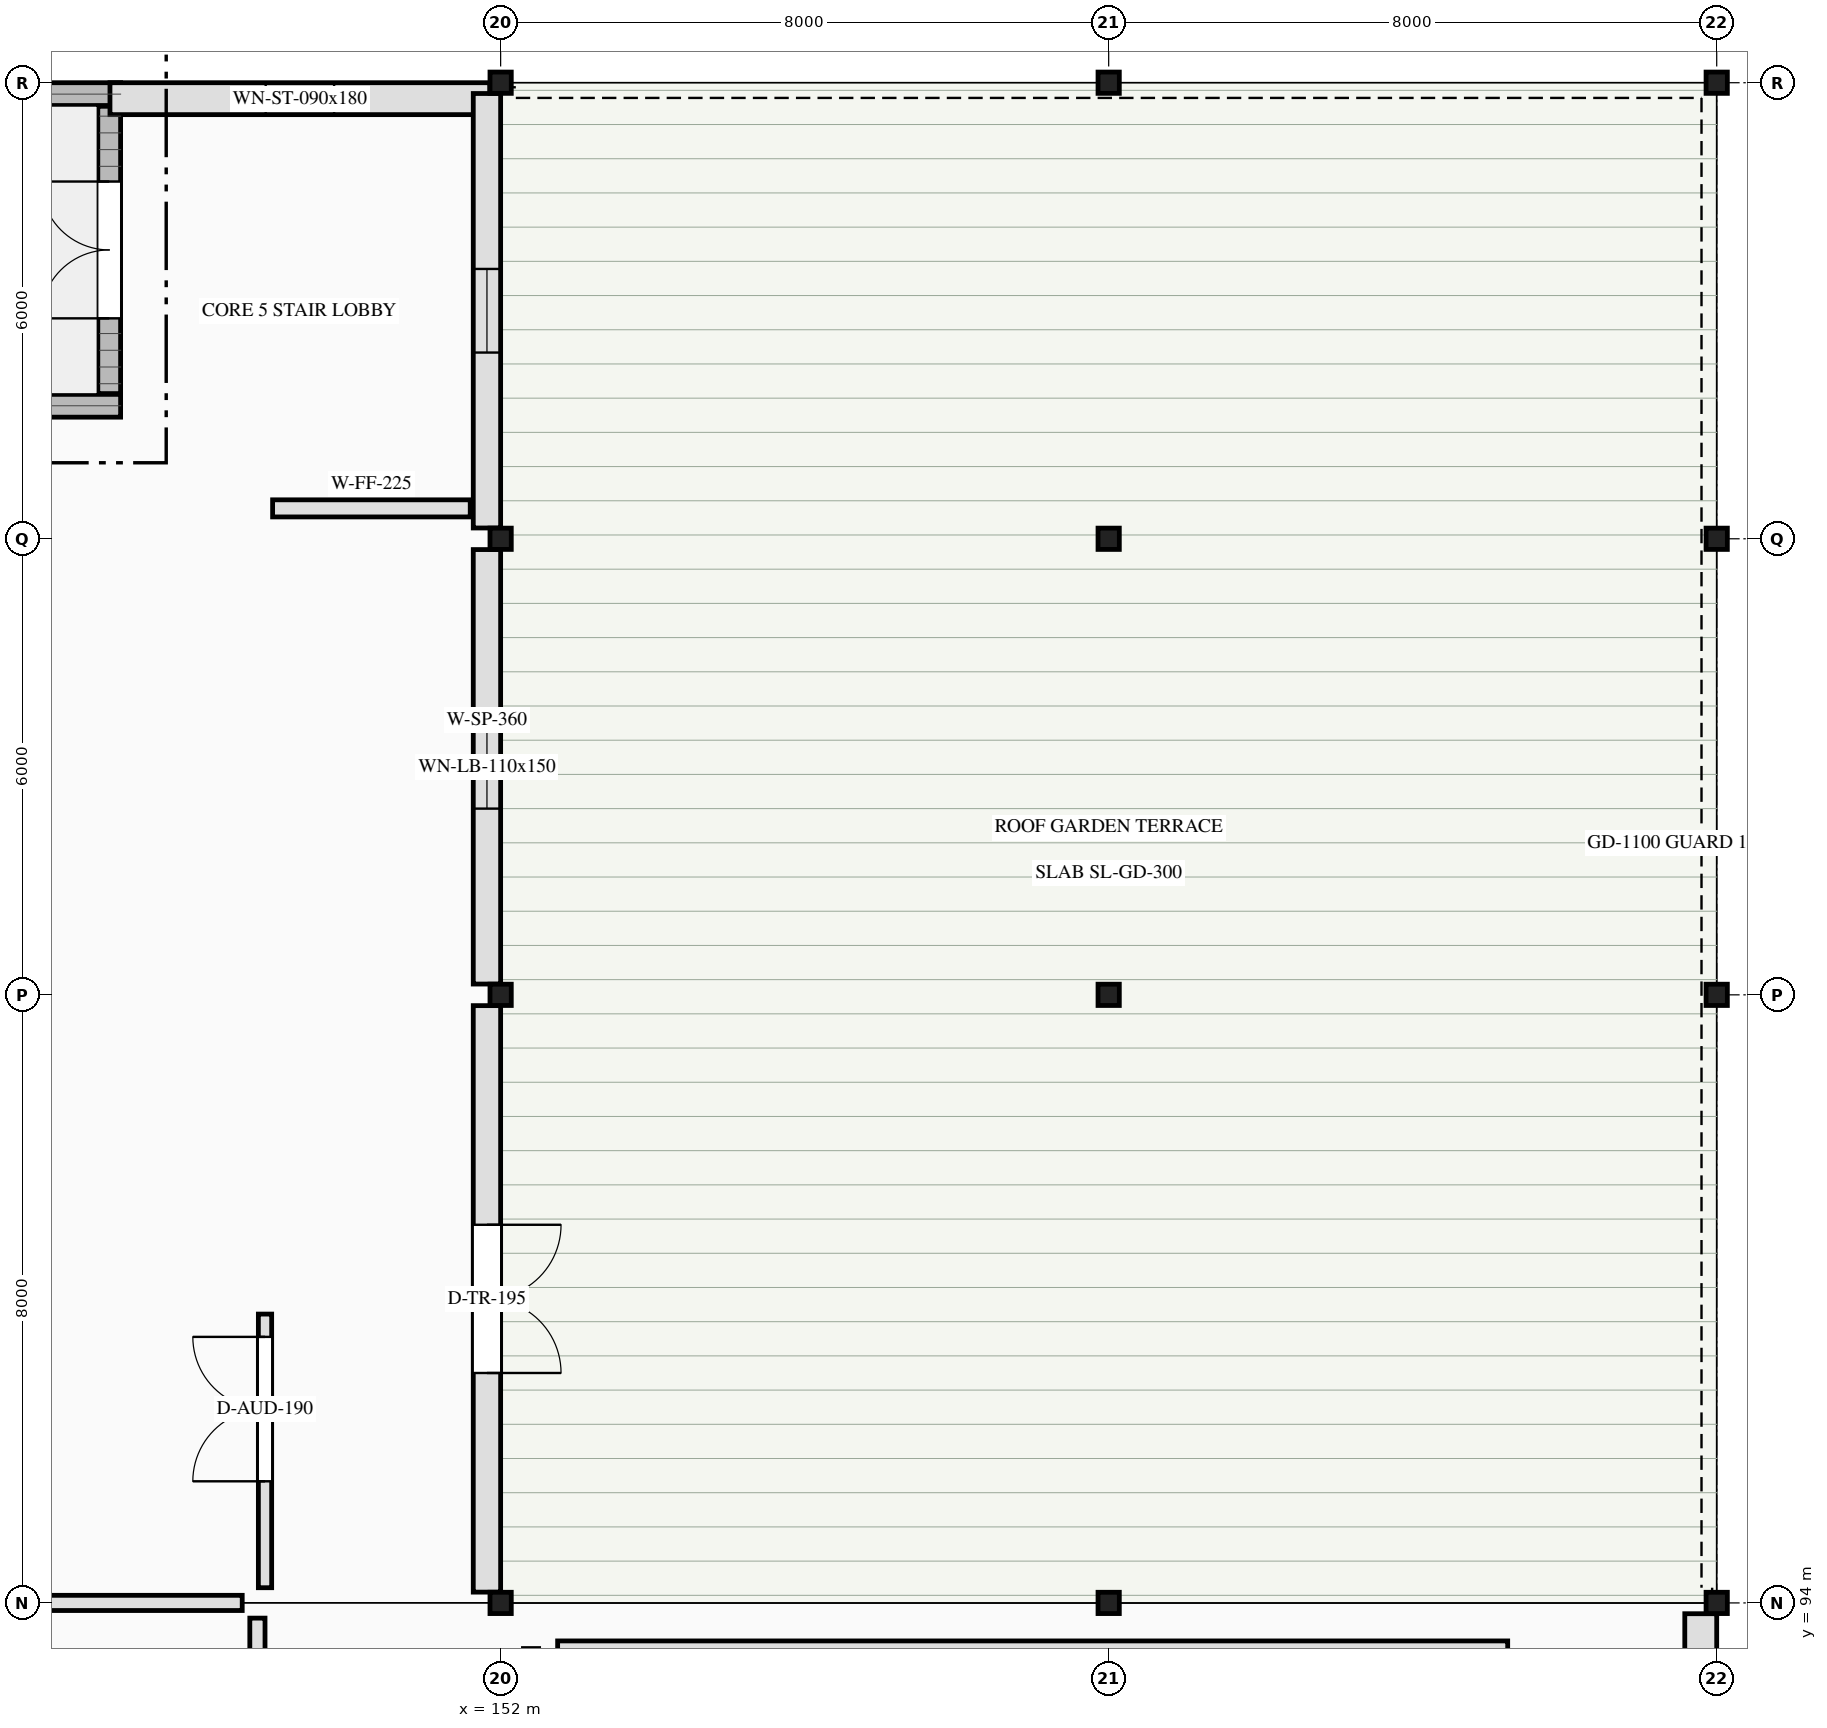
"""IFC4 building model, lengths in metres.
Left out: names, types, materials, properties, quantities, classifications, styles, units other than length and angle.
Written with IfcOpenShell. Run it as: python <this file> out.ifc"""

import sys

from ifc_helpers import new_model, si_unit, direction, frame, frame_2d, origin, origin_2d, place, context, subcontext, project, spatial, rectangle, i_section, extrude, element, fill, save


model = new_model("IFC4")
c1 = context("Model", 3, precision=1e-05, world=origin(), true_north=direction((0.0, 1.0)))
c2 = subcontext(c1, "Body", "Model", "MODEL_VIEW")
j1 = project(units=[si_unit("LENGTHUNIT", "METRE"), si_unit("PLANEANGLEUNIT", "RADIAN")], contexts=[c1])
p1 = place(None, origin())
s1 = spatial("IfcSite", under=j1, at=p1, CompositionType="ELEMENT")
p2 = place(p1, origin())
s2 = spatial("IfcBuilding", under=s1, at=p2, CompositionType="ELEMENT")
p3 = place(p2, frame((0.0, 0.0, 17.6)))
s3 = spatial("IfcBuildingStorey", under=s2, at=p3, CompositionType="ELEMENT", Elevation=17.6)
for number, where, z_axis, x_axis in (
    (1, (137.0, 109.75, 0.0), (0.0, 0.0, 1.0), (1.0, 0.0, 0.0)),
    (2, (137.0, 113.85, 0.0), (0.0, 0.0, 1.0), (1.0, 0.0, 0.0)),
):
    element("IfcWall", number, at=place(p3, frame(where, z_axis=z_axis, x_axis=x_axis)), inside=s3, PredefinedType="SHEAR", context=c2, shape_type="SweptSolid", body=[
        extrude(rectangle(XDim=10.0, YDim=0.3, at=frame_2d((5.0, 0.0))), origin(), (0.0, 0.0, 1.0), 4.2),
    ])
p4 = place(p3, frame((146.85, 109.91, 0.0), z_axis=(0.0, 0.0, 1.0), x_axis=(0.0, 1.0, 0.0)))
e3 = element("IfcWall", 3, at=p4, inside=s3, PredefinedType="SHEAR", context=c2, shape_type="SweptSolid", body=[
    extrude(rectangle(XDim=3.78, YDim=0.3, at=frame_2d((1.89, 0.0))), origin(), (0.0, 0.0, 1.0), 4.2),
])
p5 = place(p4, frame((0.99, 0.0, 0.0)))
e4 = element("IfcOpeningElement", 4, at=p5, cuts=e3, PredefinedType="OPENING", context=c2, shape_type="SweptSolid", body=[
    extrude(rectangle(XDim=1.8, YDim=2.2, at=frame_2d((0.9, 1.1))), frame((0.0, 0.16, 0.0), z_axis=(0.0, -1.0, 0.0), x_axis=(1.0, 0.0, 0.0)), (0.0, 0.0, 1.0), 0.32),
])
for number, where, z_axis, x_axis in (
    (5, (152.0, 94.0, 0.0), (0.0, 0.0, 1.0), (1.0, 0.0, 0.0)),
    (6, (152.0, 102.0, 0.0), (0.0, 0.0, 1.0), (1.0, 0.0, 0.0)),
    (7, (152.0, 108.0, 0.0), (0.0, 0.0, 1.0), (1.0, 0.0, 0.0)),
    (8, (152.0, 114.0, 0.0), (0.0, 0.0, 1.0), (1.0, 0.0, 0.0)),
    (9, (160.0, 94.0, 0.0), (0.0, 0.0, 1.0), (1.0, 0.0, 0.0)),
    (10, (160.0, 102.0, 0.0), (0.0, 0.0, 1.0), (1.0, 0.0, 0.0)),
    (11, (160.0, 108.0, 0.0), (0.0, 0.0, 1.0), (1.0, 0.0, 0.0)),
    (12, (160.0, 114.0, 0.0), (0.0, 0.0, 1.0), (1.0, 0.0, 0.0)),
    (13, (168.0, 94.0, 0.0), (0.0, 0.0, 1.0), (1.0, 0.0, 0.0)),
    (14, (168.0, 102.0, 0.0), (0.0, 0.0, 1.0), (1.0, 0.0, 0.0)),
    (15, (168.0, 108.0, 0.0), (0.0, 0.0, 1.0), (1.0, 0.0, 0.0)),
    (16, (168.0, 114.0, 0.0), (0.0, 0.0, 1.0), (1.0, 0.0, 0.0)),
):
    element("IfcColumn", number, at=place(p3, frame(where, z_axis=z_axis, x_axis=x_axis)), inside=s3, PredefinedType="COLUMN", context=c2, shape_type="SweptSolid", body=[
        extrude(i_section(OverallWidth=0.28, OverallDepth=0.28, WebThickness=0.01, FlangeThickness=0.018, FilletRadius=0.024, at=origin_2d()), origin(), (0.0, 0.0, 1.0), 4.2),
    ])
p6 = place(p3, frame((167.79, 93.858, 0.0), z_axis=(0.0, 0.0, 1.0), x_axis=(0.0, -1.0, 0.0)))
e17 = element("IfcWall", 17, at=p6, inside=s3, PredefinedType="SOLIDWALL", context=c2, shape_type="SweptSolid", body=[
    extrude(rectangle(XDim=7.716, YDim=0.42, at=frame_2d((3.858, 0.0))), origin(), (0.0, 0.0, 1.0), 3.445),
])
p7 = place(p6, frame((1.129, 0.0, 0.85)))
e18 = element("IfcOpeningElement", 18, at=p7, cuts=e17, PredefinedType="OPENING", context=c2, shape_type="SweptSolid", body=[
    extrude(rectangle(XDim=1.6, YDim=1.8, at=frame_2d((0.8, 0.9))), frame((0.0, 0.22, 0.0), z_axis=(0.0, -1.0, 0.0), x_axis=(1.0, 0.0, 0.0)), (0.0, 0.0, 1.0), 0.44),
])
p8 = place(p6, frame((4.837, 0.0, 0.85)))
e19 = element("IfcOpeningElement", 19, at=p8, cuts=e17, PredefinedType="OPENING", context=c2, shape_type="SweptSolid", body=[
    extrude(rectangle(XDim=1.9, YDim=1.8, at=frame_2d((0.95, 0.9))), frame((0.0, 0.22, 0.0), z_axis=(0.0, -1.0, 0.0), x_axis=(1.0, 0.0, 0.0)), (0.0, 0.0, 1.0), 0.44),
])
p9 = place(p3, frame((146.86, 113.79, 0.0), z_axis=(0.0, 0.0, 1.0), x_axis=(1.0, 0.0, 0.0)))
e20 = element("IfcWall", 20, at=p9, inside=s3, PredefinedType="SOLIDWALL", context=c2, shape_type="SweptSolid", body=[
    extrude(rectangle(XDim=4.998, YDim=0.42, at=frame_2d((2.499, 0.0))), origin(), (0.0, 0.0, 1.0), 3.445),
])
p10 = place(p9, frame((2.049, 0.0, 0.85)))
e21 = element("IfcOpeningElement", 21, at=p10, cuts=e20, PredefinedType="OPENING", context=c2, shape_type="SweptSolid", body=[
    extrude(rectangle(XDim=0.9, YDim=1.8, at=frame_2d((0.45, 0.9))), frame((0.0, 0.22, 0.0), z_axis=(0.0, -1.0, 0.0), x_axis=(1.0, 0.0, 0.0)), (0.0, 0.0, 1.0), 0.44),
])
p11 = place(p3, frame((151.82, 101.858, 0.0), z_axis=(0.0, 0.0, 1.0), x_axis=(0.0, -1.0, 0.0)))
e22 = element("IfcWall", 22, at=p11, inside=s3, PredefinedType="ELEMENTEDWALL", context=c2, shape_type="SweptSolid", body=[
    extrude(rectangle(XDim=7.716, YDim=0.36, at=frame_2d((3.858, 0.0))), origin(), (0.0, 0.0, 1.0), 3.545),
])
p12 = place(p11, frame((2.883, 0.0, 0.0)))
e23 = element("IfcOpeningElement", 23, at=p12, cuts=e22, PredefinedType="OPENING", context=c2, shape_type="SweptSolid", body=[
    extrude(rectangle(XDim=1.95, YDim=2.35, at=frame_2d((0.975, 1.175))), frame((0.0, 0.19, 0.0), z_axis=(0.0, -1.0, 0.0), x_axis=(1.0, 0.0, 0.0)), (0.0, 0.0, 1.0), 0.38),
])
p13 = place(p3, frame((151.82, 107.858, 0.0), z_axis=(0.0, 0.0, 1.0), x_axis=(0.0, -1.0, 0.0)))
e24 = element("IfcWall", 24, at=p13, inside=s3, PredefinedType="ELEMENTEDWALL", context=c2, shape_type="SweptSolid", body=[
    extrude(rectangle(XDim=5.716, YDim=0.36, at=frame_2d((2.858, 0.0))), origin(), (0.0, 0.0, 1.0), 3.545),
])
p14 = place(p13, frame((2.308, 0.0, 0.85)))
e25 = element("IfcOpeningElement", 25, at=p14, cuts=e24, PredefinedType="OPENING", context=c2, shape_type="SweptSolid", body=[
    extrude(rectangle(XDim=1.1, YDim=1.5, at=frame_2d((0.55, 0.75))), frame((0.0, 0.19, 0.0), z_axis=(0.0, -1.0, 0.0), x_axis=(1.0, 0.0, 0.0)), (0.0, 0.0, 1.0), 0.38),
])
p15 = place(p3, frame((151.82, 113.858, 0.0), z_axis=(0.0, 0.0, 1.0), x_axis=(0.0, -1.0, 0.0)))
e26 = element("IfcWall", 26, at=p15, inside=s3, PredefinedType="ELEMENTEDWALL", context=c2, shape_type="SweptSolid", body=[
    extrude(rectangle(XDim=5.716, YDim=0.36, at=frame_2d((2.858, 0.0))), origin(), (0.0, 0.0, 1.0), 3.545),
])
p16 = place(p15, frame((2.308, 0.0, 0.85)))
e27 = element("IfcOpeningElement", 27, at=p16, cuts=e26, PredefinedType="OPENING", context=c2, shape_type="SweptSolid", body=[
    extrude(rectangle(XDim=1.1, YDim=1.5, at=frame_2d((0.55, 0.75))), frame((0.0, 0.19, 0.0), z_axis=(0.0, -1.0, 0.0), x_axis=(1.0, 0.0, 0.0)), (0.0, 0.0, 1.0), 0.38),
])
p17 = place(p3, frame((149.0, 108.4, 0.0), z_axis=(0.0, 0.0, 1.0), x_axis=(1.0, 0.0, 0.0)))
e28 = element("IfcWall", 28, at=p17, inside=s3, PredefinedType="SOLIDWALL", context=c2, shape_type="SweptSolid", body=[
    extrude(rectangle(XDim=2.6, YDim=0.225, at=frame_2d((1.3, 0.0))), origin(), (0.0, 0.0, 1.0), 3.9),
])
p18 = place(p3, frame((148.9, 94.2, 0.0), z_axis=(0.0, 0.0, 1.0), x_axis=(0.0, 1.0, 0.0)))
e29 = element("IfcWall", 29, at=p18, inside=s3, PredefinedType="PARTITIONING", context=c2, shape_type="SweptSolid", body=[
    extrude(rectangle(XDim=3.6, YDim=0.175, at=frame_2d((1.8, 0.0))), origin(), (0.0, 0.0, 1.0), 3.9),
])
p19 = place(p18, frame((1.4, 0.0, 0.0)))
e30 = element("IfcOpeningElement", 30, at=p19, cuts=e29, PredefinedType="OPENING", context=c2, shape_type="SweptSolid", body=[
    extrude(rectangle(XDim=1.9, YDim=2.35, at=frame_2d((0.95, 1.175))), frame((0.0, 0.097, 0.0), z_axis=(0.0, -1.0, 0.0), x_axis=(1.0, 0.0, 0.0)), (0.0, 0.0, 1.0), 0.195),
])
p20 = place(p3, frame((148.8, 46.6, 0.0), z_axis=(0.0, 0.0, 1.0), x_axis=(0.0, 1.0, 0.0)))
e31 = element("IfcWall", 31, at=p20, inside=s3, PredefinedType="PARTITIONING", context=c2, shape_type="SweptSolid", body=[
    extrude(rectangle(XDim=47.2, YDim=0.2, at=frame_2d((23.6, 0.0))), origin(), (0.0, 0.0, 1.0), 3.9),
])
p21 = place(p20, frame((18.87, 0.0, 0.0)))
e32 = element("IfcOpeningElement", 32, at=p21, cuts=e31, PredefinedType="OPENING", context=c2, shape_type="SweptSolid", body=[
    extrude(rectangle(XDim=1.05, YDim=2.25, at=frame_2d((0.525, 1.125))), frame((0.0, 0.11, 0.0), z_axis=(0.0, -1.0, 0.0), x_axis=(1.0, 0.0, 0.0)), (0.0, 0.0, 1.0), 0.22),
])
p22 = place(p3, frame((136.8, 94.0, 0.0), z_axis=(0.0, 0.0, 1.0), x_axis=(1.0, 0.0, 0.0)))
e33 = element("IfcWall", 33, at=p22, inside=s3, PredefinedType="PARTITIONING", context=c2, shape_type="SweptSolid", body=[
    extrude(rectangle(XDim=11.8, YDim=0.2, at=frame_2d((5.9, 0.0))), origin(), (0.0, 0.0, 1.0), 3.55),
])
p23 = place(p22, frame((2.837, 0.0, 0.0)))
e34 = element("IfcOpeningElement", 34, at=p23, cuts=e33, PredefinedType="OPENING", context=c2, shape_type="SweptSolid", body=[
    extrude(rectangle(XDim=1.05, YDim=2.25, at=frame_2d((0.525, 1.125))), frame((0.0, 0.11, 0.0), z_axis=(0.0, -1.0, 0.0), x_axis=(1.0, 0.0, 0.0)), (0.0, 0.0, 1.0), 0.22),
])
p24 = place(p3, frame((152.75, 93.4, 0.0), z_axis=(0.0, 0.0, 1.0), x_axis=(1.0, 0.0, 0.0)))
e35 = element("IfcWall", 35, at=p24, inside=s3, PredefinedType="PARTITIONING", context=c2, shape_type="SweptSolid", body=[
    extrude(rectangle(XDim=12.5, YDim=0.2, at=frame_2d((6.25, 0.0))), origin(), (0.0, 0.0, 1.0), 3.9),
])
p25 = place(p10, origin())
e36 = element("IfcWindow", 36, at=p25, inside=s3, PartitioningType="SINGLE_PANEL", PredefinedType="WINDOW", context=c2, shape_type="SweptSolid", body=[
    extrude(rectangle(XDim=0.9, YDim=1.8, at=frame_2d((0.45, 0.9))), frame((0.0, 0.03, 0.0), z_axis=(0.0, -1.0, 0.0), x_axis=(1.0, 0.0, 0.0)), (0.0, 0.0, 1.0), 0.06),
])
fill(e21, e36)
p26 = place(p12, origin())
e37 = element("IfcDoor", 37, at=p26, inside=s3, OperationType="DOUBLE_DOOR_SINGLE_SWING", PredefinedType="DOOR", context=c2, shape_type="SweptSolid", body=[
    extrude(rectangle(XDim=1.95, YDim=2.35, at=frame_2d((0.975, 1.175))), frame((0.0, 0.025, 0.0), z_axis=(0.0, -1.0, 0.0), x_axis=(1.0, 0.0, 0.0)), (0.0, 0.0, 1.0), 0.05),
])
fill(e23, e37)
p27 = place(p14, origin())
e38 = element("IfcWindow", 38, at=p27, inside=s3, PartitioningType="SINGLE_PANEL", PredefinedType="WINDOW", context=c2, shape_type="SweptSolid", body=[
    extrude(rectangle(XDim=1.1, YDim=1.5, at=frame_2d((0.55, 0.75))), frame((0.0, 0.03, 0.0), z_axis=(0.0, -1.0, 0.0), x_axis=(1.0, 0.0, 0.0)), (0.0, 0.0, 1.0), 0.06),
])
fill(e25, e38)
p28 = place(p16, origin())
e39 = element("IfcWindow", 39, at=p28, inside=s3, PartitioningType="SINGLE_PANEL", PredefinedType="WINDOW", context=c2, shape_type="SweptSolid", body=[
    extrude(rectangle(XDim=1.1, YDim=1.5, at=frame_2d((0.55, 0.75))), frame((0.0, 0.03, 0.0), z_axis=(0.0, -1.0, 0.0), x_axis=(1.0, 0.0, 0.0)), (0.0, 0.0, 1.0), 0.06),
])
fill(e27, e39)
p29 = place(p5, origin())
e40 = element("IfcDoor", 40, at=p29, inside=s3, OperationType="DOUBLE_DOOR_SINGLE_SWING", PredefinedType="DOOR", context=c2, shape_type="SweptSolid", body=[
    extrude(rectangle(XDim=1.8, YDim=2.2, at=frame_2d((0.9, 1.1))), frame((0.0, 0.025, 0.0), z_axis=(0.0, -1.0, 0.0), x_axis=(1.0, 0.0, 0.0)), (0.0, 0.0, 1.0), 0.05),
])
fill(e4, e40)
p30 = place(p19, origin())
e41 = element("IfcDoor", 41, at=p30, inside=s3, OperationType="DOUBLE_DOOR_SINGLE_SWING", PredefinedType="DOOR", context=c2, shape_type="SweptSolid", body=[
    extrude(rectangle(XDim=1.9, YDim=2.35, at=frame_2d((0.95, 1.175))), frame((0.0, 0.025, 0.0), z_axis=(0.0, -1.0, 0.0), x_axis=(1.0, 0.0, 0.0)), (0.0, 0.0, 1.0), 0.05),
])
fill(e30, e41)
save(model, sys.argv[1])
